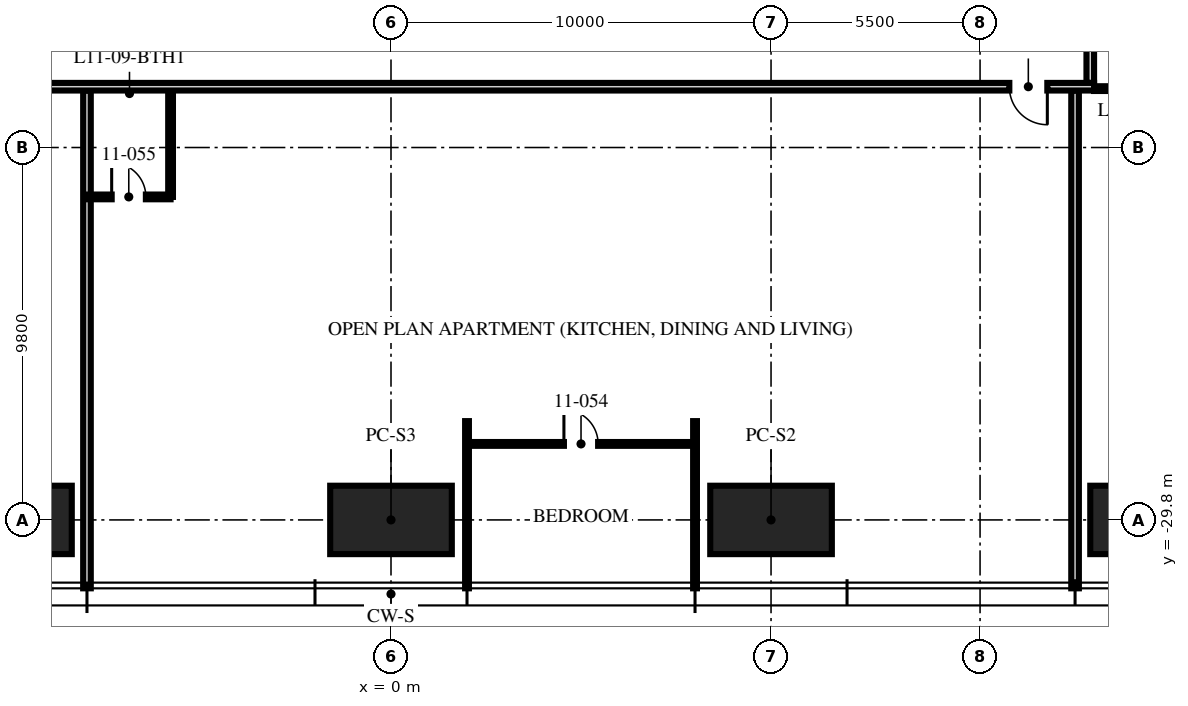
"""IFC4 building model, lengths in metres.
Left out: names, types, materials, properties, quantities, classifications, styles, units other than length and angle.
Written with IfcOpenShell. Run it as: python <this file> out.ifc"""

import sys

from ifc_helpers import new_model, si_unit, direction, frame, frame_2d, origin, origin_2d, place, context, subcontext, project, spatial, rectangle, hollow_rectangle, extrude, element, fill, save


model = new_model("IFC4")
c1 = context("Model", 3, precision=1e-05, world=origin(), true_north=direction((0.0, 1.0)))
c2 = subcontext(c1, "Body", "Model", "MODEL_VIEW")
j1 = project(units=[si_unit("LENGTHUNIT", "METRE"), si_unit("PLANEANGLEUNIT", "RADIAN")], contexts=[c1])
p1 = place(None, origin())
s1 = spatial("IfcSite", under=j1, at=p1, CompositionType="ELEMENT")
p2 = place(p1, origin())
s2 = spatial("IfcBuilding", under=s1, at=p2, CompositionType="ELEMENT")
p3 = place(p2, frame((0.0, 0.0, 47.25)))
s3 = spatial("IfcBuildingStorey", under=s2, at=p3, CompositionType="ELEMENT", Elevation=47.25)
for number, where, z_axis, x_axis in (
    (1, (20.0, -29.8, 0.0), (0.0, 0.0, 1.0), (1.0, 0.0, 0.0)),
    (2, (10.0, -29.8, 0.0), (0.0, 0.0, 1.0), (1.0, 0.0, 0.0)),
    (3, (0.0, -29.8, 0.0), (0.0, 0.0, 1.0), (1.0, 0.0, 0.0)),
    (4, (-10.0, -29.8, 0.0), (0.0, 0.0, 1.0), (1.0, 0.0, 0.0)),
):
    element("IfcColumn", number, at=place(p3, frame(where, z_axis=z_axis, x_axis=x_axis)), inside=s3, PredefinedType="COLUMN", context=c2, shape_type="SweptSolid", body=[
        extrude(hollow_rectangle(XDim=3.2, YDim=1.8, WallThickness=0.2, at=origin_2d()), origin(), (0.0, 0.0, 1.0), 3.75),
    ])
p4 = place(p3, frame((-8.0, -18.5, 0.0), z_axis=(0.0, 0.0, 1.0), x_axis=(0.0, -1.0, 0.0)))
e5 = element("IfcWall", 5, at=p4, inside=s3, PredefinedType="PARTITIONING", context=c2, shape_type="SweptSolid", body=[
    extrude(rectangle(XDim=13.1, YDim=0.2, at=frame_2d((6.55, 0.0))), origin(), (0.0, 0.0, 1.0), 2.71),
])
for number, where, z_axis, x_axis in (
    (6, (2.0, -27.2, 0.0), (0.0, 0.0, 1.0), (0.0, -1.0, 0.0)),
    (7, (8.0, -27.2, 0.0), (0.0, 0.0, 1.0), (0.0, -1.0, 0.0)),
):
    element("IfcWall", number, at=place(p3, frame(where, z_axis=z_axis, x_axis=x_axis)), inside=s3, PredefinedType="PARTITIONING", context=c2, shape_type="SweptSolid", body=[
        extrude(rectangle(XDim=4.4, YDim=0.1, at=frame_2d((2.2, 0.0))), origin(), (0.0, 0.0, 1.0), 2.71),
    ])
p5 = place(p3, frame((18.0, -18.5, 0.0), z_axis=(0.0, 0.0, 1.0), x_axis=(0.0, -1.0, 0.0)))
e8 = element("IfcWall", 8, at=p5, inside=s3, PredefinedType="PARTITIONING", context=c2, shape_type="SweptSolid", body=[
    extrude(rectangle(XDim=13.1, YDim=0.2, at=frame_2d((6.55, 0.0))), origin(), (0.0, 0.0, 1.0), 2.3),
])
p6 = place(p3, frame((2.0, -27.8, 0.0), z_axis=(0.0, 0.0, 1.0), x_axis=(1.0, 0.0, 0.0)))
e9 = element("IfcWall", 9, at=p6, inside=s3, PredefinedType="PARTITIONING", context=c2, shape_type="SweptSolid", body=[
    extrude(rectangle(XDim=6.0, YDim=0.1, at=frame_2d((3.0, 0.0))), origin(), (0.0, 0.0, 1.0), 2.61),
])
p7 = place(p6, frame((2.55, 0.0, 0.0)))
e10 = element("IfcOpeningElement", 10, at=p7, cuts=e9, PredefinedType="OPENING", context=c2, shape_type="SweptSolid", body=[
    extrude(rectangle(XDim=0.9, YDim=2.1, at=frame_2d((0.45, 1.05))), frame((0.0, 0.06, 0.0), z_axis=(0.0, -1.0, 0.0), x_axis=(1.0, 0.0, 0.0)), (0.0, 0.0, 1.0), 0.12),
])
p8 = place(p3, frame((-8.0, -21.3, 0.0), z_axis=(0.0, 0.0, 1.0), x_axis=(1.0, 0.0, 0.0)))
e11 = element("IfcWall", 11, at=p8, inside=s3, PredefinedType="PARTITIONING", context=c2, shape_type="SweptSolid", body=[
    extrude(rectangle(XDim=2.2, YDim=0.125, at=frame_2d((1.1, 0.0))), origin(), (0.0, 0.0, 1.0), 3.5),
])
p9 = place(p8, frame((0.65, 0.0, 0.0)))
e12 = element("IfcOpeningElement", 12, at=p9, cuts=e11, PredefinedType="OPENING", context=c2, shape_type="SweptSolid", body=[
    extrude(rectangle(XDim=0.9, YDim=2.1, at=frame_2d((0.45, 1.05))), frame((0.0, 0.073, 0.0), z_axis=(0.0, -1.0, 0.0), x_axis=(1.0, 0.0, 0.0)), (0.0, 0.0, 1.0), 0.145),
])
p10 = place(p3, frame((-5.8, -18.5, 0.0), z_axis=(0.0, 0.0, 1.0), x_axis=(0.0, -1.0, 0.0)))
e13 = element("IfcWall", 13, at=p10, inside=s3, PredefinedType="PARTITIONING", context=c2, shape_type="SweptSolid", body=[
    extrude(rectangle(XDim=2.8, YDim=0.125, at=frame_2d((1.4, 0.0))), origin(), (0.0, 0.0, 1.0), 3.5),
])
p11 = place(p3, frame((18.5, -18.45, 0.0), z_axis=(0.0, 0.0, 1.0), x_axis=(1.0, 0.0, 0.0)))
e14 = element("IfcWall", 14, at=p11, inside=s3, PredefinedType="PARTITIONING", context=c2, shape_type="SweptSolid", body=[
    extrude(rectangle(XDim=2.8, YDim=0.125, at=frame_2d((1.4, 0.0))), origin(), (0.0, 0.0, 1.0), 2.3),
])
p12 = place(p3, frame((18.4, -18.3, 0.0), z_axis=(0.0, 0.0, 1.0), x_axis=(0.0, 1.0, 0.0)))
e15 = element("IfcWall", 15, at=p12, inside=s3, PredefinedType="PARTITIONING", context=c2, shape_type="SweptSolid", body=[
    extrude(rectangle(XDim=8.3, YDim=0.2, at=frame_2d((4.15, 0.0))), origin(), (0.0, 0.0, 1.0), 2.3),
])
p13 = place(p12, frame((4.7, 0.0, 0.0)))
e16 = element("IfcOpeningElement", 16, at=p13, cuts=e15, PredefinedType="OPENING", context=c2, shape_type="SweptSolid", body=[
    extrude(rectangle(XDim=1.0, YDim=2.2, at=frame_2d((0.5, 1.1))), frame((0.0, 0.11, 0.0), z_axis=(0.0, -1.0, 0.0), x_axis=(1.0, 0.0, 0.0)), (0.0, 0.0, 1.0), 0.22),
])
p14 = place(p3, frame((18.5, -18.4, 0.0), z_axis=(0.0, 0.0, 1.0), x_axis=(-1.0, 0.0, 0.0)))
e17 = element("IfcWall", 17, at=p14, inside=s3, PredefinedType="PARTITIONING", context=c2, shape_type="SweptSolid", body=[
    extrude(rectangle(XDim=37.0, YDim=0.2, at=frame_2d((18.5, 0.0))), origin(), (0.0, 0.0, 1.0), 2.3),
])
p15 = place(p14, frame((1.23, 0.0, 0.0)))
e18 = element("IfcOpeningElement", 18, at=p15, cuts=e17, PredefinedType="OPENING", context=c2, shape_type="SweptSolid", body=[
    extrude(rectangle(XDim=1.0, YDim=2.2, at=frame_2d((0.5, 1.1))), frame((0.0, 0.11, 0.0), z_axis=(0.0, -1.0, 0.0), x_axis=(1.0, 0.0, 0.0)), (0.0, 0.0, 1.0), 0.22),
])
p16 = place(p7, origin())
e19 = element("IfcDoor", 19, at=p16, inside=s3, OperationType="SINGLE_SWING_LEFT", PredefinedType="DOOR", context=c2, shape_type="SweptSolid", body=[
    extrude(rectangle(XDim=0.9, YDim=2.1, at=frame_2d((0.45, 1.05))), frame((0.0, 0.025, 0.0), z_axis=(0.0, -1.0, 0.0), x_axis=(1.0, 0.0, 0.0)), (0.0, 0.0, 1.0), 0.05),
])
fill(e10, e19)
p17 = place(p9, origin())
e20 = element("IfcDoor", 20, at=p17, inside=s3, OperationType="SINGLE_SWING_LEFT", PredefinedType="DOOR", context=c2, shape_type="SweptSolid", body=[
    extrude(rectangle(XDim=0.9, YDim=2.1, at=frame_2d((0.45, 1.05))), frame((0.0, 0.025, 0.0), z_axis=(0.0, -1.0, 0.0), x_axis=(1.0, 0.0, 0.0)), (0.0, 0.0, 1.0), 0.05),
])
fill(e12, e20)
p18 = place(p15, origin())
e21 = element("IfcDoor", 21, at=p18, inside=s3, OperationType="SINGLE_SWING_LEFT", PredefinedType="DOOR", context=c2, shape_type="SweptSolid", body=[
    extrude(rectangle(XDim=1.0, YDim=2.2, at=frame_2d((0.5, 1.1))), frame((0.0, 0.025, 0.0), z_axis=(0.0, -1.0, 0.0), x_axis=(1.0, 0.0, 0.0)), (0.0, 0.0, 1.0), 0.05),
])
fill(e18, e21)
save(model, sys.argv[1])
